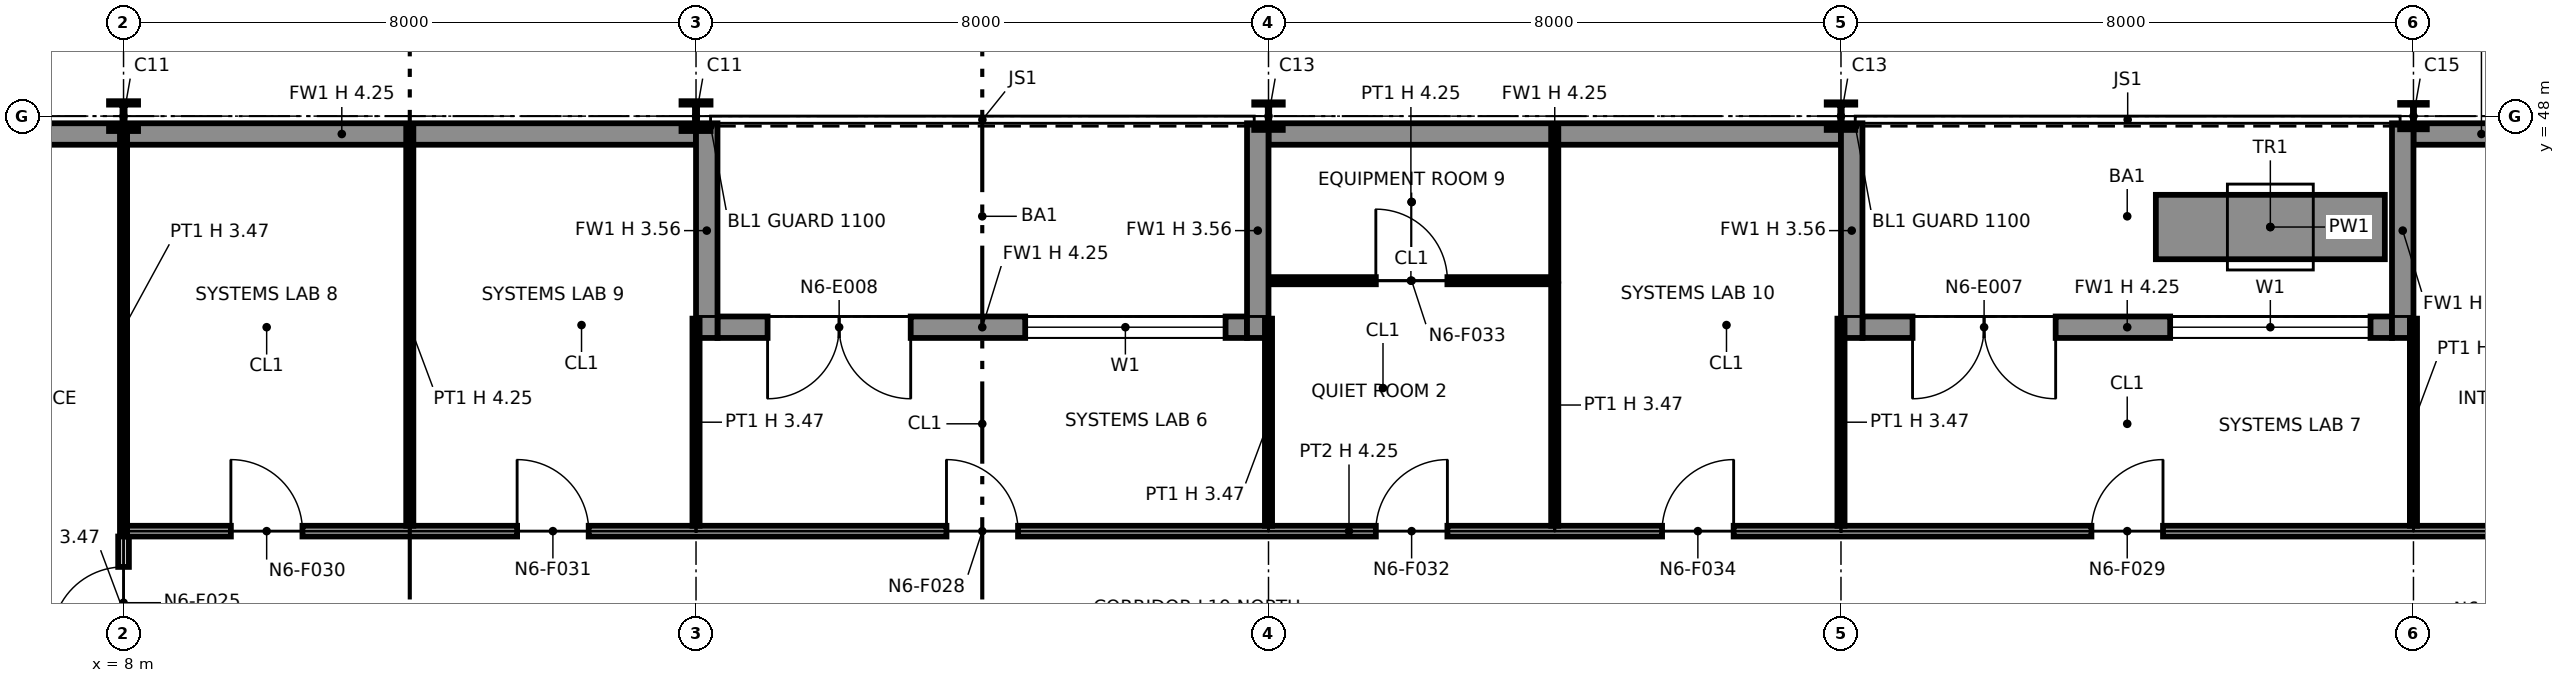
"""IFC4 building model, lengths in metres.
Left out: names, types, materials, properties, quantities, classifications, styles, units other than length and angle.
Written with IfcOpenShell. Run it as: python <this file> out.ifc"""

import sys

from ifc_helpers import new_model, si_unit, direction, frame, frame_2d, origin, origin_2d, place, context, subcontext, project, spatial, polyline, rectangle, i_section, outline, extrude, element, fill, save


model = new_model("IFC4")
c1 = context("Model", 3, precision=1e-05, world=origin(), true_north=direction((0.0, 1.0)))
c2 = subcontext(c1, "Body", "Model", "MODEL_VIEW")
j1 = project(units=[si_unit("LENGTHUNIT", "METRE"), si_unit("PLANEANGLEUNIT", "RADIAN")], contexts=[c1])
p1 = place(None, origin())
s1 = spatial("IfcSite", under=j1, at=p1, CompositionType="ELEMENT")
p2 = place(p1, origin())
s2 = spatial("IfcBuilding", under=s1, at=p2, CompositionType="ELEMENT")
p3 = place(p2, frame((0.0, 0.0, 100.8)))
s3 = spatial("IfcBuildingStorey", under=s2, at=p3, CompositionType="ELEMENT", Elevation=100.8)
for number, where, z_axis, x_axis in (
    (1, (8.0, 48.0, 0.0), (0.0, 0.0, 1.0), (1.0, 0.0, 0.0)),
    (2, (16.0, 48.0, 0.0), (0.0, 0.0, 1.0), (1.0, 0.0, 0.0)),
):
    element("IfcColumn", number, at=place(p3, frame(where, z_axis=z_axis, x_axis=x_axis)), inside=s3, PredefinedType="COLUMN", context=c2, shape_type="SweptSolid", body=[
        extrude(i_section(OverallWidth=0.406, OverallDepth=0.417, WebThickness=0.03, FlangeThickness=0.048, at=origin_2d()), origin(), (0.0, 0.0, 1.0), 4.25),
    ])
for number, where, z_axis, x_axis in (
    (3, (24.0, 48.0, 0.0), (0.0, 0.0, 1.0), (1.0, 0.0, 0.0)),
    (4, (32.0, 48.0, 0.0), (0.0, 0.0, 1.0), (1.0, 0.0, 0.0)),
):
    element("IfcColumn", number, at=place(p3, frame(where, z_axis=z_axis, x_axis=x_axis)), inside=s3, PredefinedType="COLUMN", context=c2, shape_type="SweptSolid", body=[
        extrude(i_section(OverallWidth=0.399, OverallDepth=0.386, WebThickness=0.021, FlangeThickness=0.033, at=origin_2d()), origin(), (0.0, 0.0, 1.0), 4.25),
    ])
p4 = place(p3, frame((40.0, 48.0, 0.0), z_axis=(0.0, 0.0, 1.0), x_axis=(1.0, 0.0, 0.0)))
e5 = element("IfcColumn", 5, at=p4, inside=s3, PredefinedType="COLUMN", context=c2, shape_type="SweptSolid", body=[
    extrude(i_section(OverallWidth=0.373, OverallDepth=0.368, WebThickness=0.015, FlangeThickness=0.024, at=origin_2d()), origin(), (0.0, 0.0, 1.0), 4.25),
])
p5 = place(p3, frame((41.9, 47.75, 0.0), z_axis=(0.0, 0.0, 1.0), x_axis=(-1.0, 0.0, 0.0)))
e6 = element("IfcWall", 6, at=p5, inside=s3, PredefinedType="SOLIDWALL", context=c2, shape_type="SweptSolid", body=[
    extrude(rectangle(XDim=1.9, YDim=0.3, at=frame_2d((0.95, 0.0))), origin(), (0.0, 0.0, 1.0), 4.25),
])
p6 = place(p3, frame((39.7, 45.05, 0.0), z_axis=(0.0, 0.0, 1.0), x_axis=(-1.0, 0.0, 0.0)))
e7 = element("IfcWall", 7, at=p6, inside=s3, PredefinedType="SOLIDWALL", context=c2, shape_type="SweptSolid", body=[
    extrude(rectangle(XDim=7.4, YDim=0.3, at=frame_2d((3.7, 0.0))), origin(), (0.0, 0.0, 1.0), 4.25),
])
p7 = place(p6, frame((0.3, 0.0, 0.9)))
e8 = element("IfcOpeningElement", 8, at=p7, cuts=e7, PredefinedType="OPENING", context=c2, shape_type="SweptSolid", body=[
    extrude(rectangle(XDim=2.8, YDim=2.2, at=frame_2d((1.4, 1.1))), frame((0.0, 0.16, 0.0), z_axis=(0.0, -1.0, 0.0), x_axis=(1.0, 0.0, 0.0)), (0.0, 0.0, 1.0), 0.32),
])
p8 = place(p6, frame((4.7, 0.0, 0.0)))
e9 = element("IfcOpeningElement", 9, at=p8, cuts=e7, PredefinedType="OPENING", context=c2, shape_type="SweptSolid", body=[
    extrude(rectangle(XDim=2.0, YDim=2.4, at=frame_2d((1.0, 1.2))), frame((0.0, 0.16, 0.0), z_axis=(0.0, -1.0, 0.0), x_axis=(1.0, 0.0, 0.0)), (0.0, 0.0, 1.0), 0.32),
])
p9 = place(p3, frame((39.85, 47.9, 0.0), z_axis=(0.0, 0.0, 1.0), x_axis=(0.0, -1.0, 0.0)))
e10 = element("IfcWall", 10, at=p9, inside=s3, PredefinedType="SOLIDWALL", context=c2, shape_type="SweptSolid", body=[
    extrude(rectangle(XDim=3.0, YDim=0.3, at=frame_2d((1.5, 0.0))), origin(), (0.0, 0.0, 1.0), 3.469),
])
p10 = place(p3, frame((32.15, 47.9, 0.0), z_axis=(0.0, 0.0, 1.0), x_axis=(0.0, -1.0, 0.0)))
e11 = element("IfcWall", 11, at=p10, inside=s3, PredefinedType="SOLIDWALL", context=c2, shape_type="SweptSolid", body=[
    extrude(rectangle(XDim=3.0, YDim=0.3, at=frame_2d((1.5, 0.0))), origin(), (0.0, 0.0, 1.0), 3.556),
])
p11 = place(p3, frame((32.0, 47.75, 0.0), z_axis=(0.0, 0.0, 1.0), x_axis=(-1.0, 0.0, 0.0)))
e12 = element("IfcWall", 12, at=p11, inside=s3, PredefinedType="SOLIDWALL", context=c2, shape_type="SweptSolid", body=[
    extrude(rectangle(XDim=8.0, YDim=0.3, at=frame_2d((4.0, 0.0))), origin(), (0.0, 0.0, 1.0), 4.25),
])
p12 = place(p3, frame((23.7, 45.05, 0.0), z_axis=(0.0, 0.0, 1.0), x_axis=(-1.0, 0.0, 0.0)))
e13 = element("IfcWall", 13, at=p12, inside=s3, PredefinedType="SOLIDWALL", context=c2, shape_type="SweptSolid", body=[
    extrude(rectangle(XDim=7.4, YDim=0.3, at=frame_2d((3.7, 0.0))), origin(), (0.0, 0.0, 1.0), 4.25),
])
p13 = place(p12, frame((0.3, 0.0, 0.9)))
e14 = element("IfcOpeningElement", 14, at=p13, cuts=e13, PredefinedType="OPENING", context=c2, shape_type="SweptSolid", body=[
    extrude(rectangle(XDim=2.8, YDim=2.2, at=frame_2d((1.4, 1.1))), frame((0.0, 0.16, 0.0), z_axis=(0.0, -1.0, 0.0), x_axis=(1.0, 0.0, 0.0)), (0.0, 0.0, 1.0), 0.32),
])
p14 = place(p12, frame((4.7, 0.0, 0.0)))
e15 = element("IfcOpeningElement", 15, at=p14, cuts=e13, PredefinedType="OPENING", context=c2, shape_type="SweptSolid", body=[
    extrude(rectangle(XDim=2.0, YDim=2.4, at=frame_2d((1.0, 1.2))), frame((0.0, 0.16, 0.0), z_axis=(0.0, -1.0, 0.0), x_axis=(1.0, 0.0, 0.0)), (0.0, 0.0, 1.0), 0.32),
])
for number, where, z_axis, x_axis in (
    (16, (23.85, 47.9, 0.0), (0.0, 0.0, 1.0), (0.0, -1.0, 0.0)),
    (17, (16.15, 47.9, 0.0), (0.0, 0.0, 1.0), (0.0, -1.0, 0.0)),
):
    element("IfcWall", number, at=place(p3, frame(where, z_axis=z_axis, x_axis=x_axis)), inside=s3, PredefinedType="SOLIDWALL", context=c2, shape_type="SweptSolid", body=[
        extrude(rectangle(XDim=3.0, YDim=0.3, at=frame_2d((1.5, 0.0))), origin(), (0.0, 0.0, 1.0), 3.556),
    ])
p15 = place(p3, frame((16.0, 47.75, 0.0), z_axis=(0.0, 0.0, 1.0), x_axis=(-1.0, 0.0, 0.0)))
e18 = element("IfcWall", 18, at=p15, inside=s3, PredefinedType="SOLIDWALL", context=c2, shape_type="SweptSolid", body=[
    extrude(rectangle(XDim=9.9, YDim=0.3, at=frame_2d((4.95, 0.0))), origin(), (0.0, 0.0, 1.0), 4.25),
])
p16 = place(p3, frame((39.6, 46.45, 0.0), z_axis=(0.0, 0.0, 1.0), x_axis=(-1.0, 0.0, 0.0)))
e19 = element("IfcWall", 19, at=p16, inside=s3, PredefinedType="SOLIDWALL", context=c2, shape_type="SweptSolid", body=[
    extrude(rectangle(XDim=3.2, YDim=0.9, at=frame_2d((1.6, 0.0))), origin(), (0.0, 0.0, 1.0), 0.6),
])
p17 = place(p3, frame((8.0, 40.03, 0.0), z_axis=(0.0, 0.0, 1.0), x_axis=(0.0, 1.0, 0.0)))
e20 = element("IfcWall", 20, at=p17, inside=s3, PredefinedType="PARTITIONING", context=c2, shape_type="SweptSolid", body=[
    extrude(rectangle(XDim=2.095, YDim=0.15, at=frame_2d((1.047, 0.0))), origin(), (0.0, 0.0, 1.0), 3.47),
])
p18 = place(p17, frame((0.67, 0.0, 0.0)))
e21 = element("IfcOpeningElement", 21, at=p18, cuts=e20, PredefinedType="OPENING", context=c2, shape_type="SweptSolid", body=[
    extrude(rectangle(XDim=1.0, YDim=2.1, at=frame_2d((0.5, 1.05))), frame((0.0, 0.085, 0.0), z_axis=(0.0, -1.0, 0.0), x_axis=(1.0, 0.0, 0.0)), (0.0, 0.0, 1.0), 0.17),
])
p19 = place(p3, frame((8.05, 42.2, 0.0), z_axis=(0.0, 0.0, 1.0), x_axis=(1.0, 0.0, 0.0)))
e22 = element("IfcWall", 22, at=p19, inside=s3, PredefinedType="PARTITIONING", context=c2, shape_type="SweptSolid", body=[
    extrude(rectangle(XDim=34.15, YDim=0.15, at=frame_2d((17.075, 0.0))), origin(), (0.0, 0.0, 1.0), 4.25),
])
p20 = place(p19, frame((11.45, 0.0, 0.0)))
e23 = element("IfcOpeningElement", 23, at=p20, cuts=e22, PredefinedType="OPENING", context=c2, shape_type="SweptSolid", body=[
    extrude(rectangle(XDim=1.0, YDim=2.1, at=frame_2d((0.5, 1.05))), frame((0.0, 0.085, 0.0), z_axis=(0.0, -1.0, 0.0), x_axis=(1.0, 0.0, 0.0)), (0.0, 0.0, 1.0), 0.17),
])
p21 = place(p19, frame((27.45, 0.0, 0.0)))
e24 = element("IfcOpeningElement", 24, at=p21, cuts=e22, PredefinedType="OPENING", context=c2, shape_type="SweptSolid", body=[
    extrude(rectangle(XDim=1.0, YDim=2.1, at=frame_2d((0.5, 1.05))), frame((0.0, 0.085, 0.0), z_axis=(0.0, -1.0, 0.0), x_axis=(1.0, 0.0, 0.0)), (0.0, 0.0, 1.0), 0.17),
])
p22 = place(p19, frame((1.45, 0.0, 0.0)))
e25 = element("IfcOpeningElement", 25, at=p22, cuts=e22, PredefinedType="OPENING", context=c2, shape_type="SweptSolid", body=[
    extrude(rectangle(XDim=1.0, YDim=2.1, at=frame_2d((0.5, 1.05))), frame((0.0, 0.085, 0.0), z_axis=(0.0, -1.0, 0.0), x_axis=(1.0, 0.0, 0.0)), (0.0, 0.0, 1.0), 0.17),
])
p23 = place(p19, frame((5.45, 0.0, 0.0)))
e26 = element("IfcOpeningElement", 26, at=p23, cuts=e22, PredefinedType="OPENING", context=c2, shape_type="SweptSolid", body=[
    extrude(rectangle(XDim=1.0, YDim=2.1, at=frame_2d((0.5, 1.05))), frame((0.0, 0.085, 0.0), z_axis=(0.0, -1.0, 0.0), x_axis=(1.0, 0.0, 0.0)), (0.0, 0.0, 1.0), 0.17),
])
p24 = place(p19, frame((17.45, 0.0, 0.0)))
e27 = element("IfcOpeningElement", 27, at=p24, cuts=e22, PredefinedType="OPENING", context=c2, shape_type="SweptSolid", body=[
    extrude(rectangle(XDim=1.0, YDim=2.1, at=frame_2d((0.5, 1.05))), frame((0.0, 0.085, 0.0), z_axis=(0.0, -1.0, 0.0), x_axis=(1.0, 0.0, 0.0)), (0.0, 0.0, 1.0), 0.17),
])
p25 = place(p19, frame((21.45, 0.0, 0.0)))
e28 = element("IfcOpeningElement", 28, at=p25, cuts=e22, PredefinedType="OPENING", context=c2, shape_type="SweptSolid", body=[
    extrude(rectangle(XDim=1.0, YDim=2.1, at=frame_2d((0.5, 1.05))), frame((0.0, 0.085, 0.0), z_axis=(0.0, -1.0, 0.0), x_axis=(1.0, 0.0, 0.0)), (0.0, 0.0, 1.0), 0.17),
])
p26 = place(p3, frame((8.0, 42.2, 0.0), z_axis=(0.0, 0.0, 1.0), x_axis=(0.0, 1.0, 0.0)))
e29 = element("IfcWall", 29, at=p26, inside=s3, PredefinedType="PARTITIONING", context=c2, shape_type="SweptSolid", body=[
    extrude(rectangle(XDim=5.67, YDim=0.1, at=frame_2d((2.835, 0.0))), origin(), (0.0, 0.0, 1.0), 3.47),
])
p27 = place(p3, frame((12.0, 42.275, 0.0), z_axis=(0.0, 0.0, 1.0), x_axis=(0.0, 1.0, 0.0)))
e30 = element("IfcWall", 30, at=p27, inside=s3, PredefinedType="PARTITIONING", context=c2, shape_type="SweptSolid", body=[
    extrude(outline(polyline([(0.0, 0.0), (5.595, 0.0), (5.595, 4.25), (2.025, 4.25), (2.023, 3.47), (1.427, 3.47), (1.425, 4.25), (0.0, 4.25), (0.0, 0.0)])), frame((0.0, 0.05, 0.0), z_axis=(0.0, -1.0, 0.0), x_axis=(1.0, 0.0, 0.0)), (0.0, 0.0, 1.0), 0.1),
])
for number, where, z_axis, x_axis in (
    (31, (16.0, 42.275, 0.0), (0.0, 0.0, 1.0), (0.0, 1.0, 0.0)),
    (32, (24.0, 42.275, 0.0), (0.0, 0.0, 1.0), (0.0, 1.0, 0.0)),
):
    element("IfcWall", number, at=place(p3, frame(where, z_axis=z_axis, x_axis=x_axis)), inside=s3, PredefinedType="PARTITIONING", context=c2, shape_type="SweptSolid", body=[
        extrude(rectangle(XDim=2.895, YDim=0.1, at=frame_2d((1.448, 0.0))), origin(), (0.0, 0.0, 1.0), 3.47),
    ])
p28 = place(p3, frame((28.0, 42.275, 0.0), z_axis=(0.0, 0.0, 1.0), x_axis=(0.0, 1.0, 0.0)))
e33 = element("IfcWall", 33, at=p28, inside=s3, PredefinedType="PARTITIONING", context=c2, shape_type="SweptSolid", body=[
    extrude(rectangle(XDim=3.375, YDim=0.1, at=frame_2d((1.688, 0.0))), origin(), (0.0, 0.0, 1.0), 3.47),
])
for number, where, z_axis, x_axis in (
    (34, (32.0, 42.275, 0.0), (0.0, 0.0, 1.0), (0.0, 1.0, 0.0)),
    (35, (40.0, 42.275, 0.0), (0.0, 0.0, 1.0), (0.0, 1.0, 0.0)),
):
    element("IfcWall", number, at=place(p3, frame(where, z_axis=z_axis, x_axis=x_axis)), inside=s3, PredefinedType="PARTITIONING", context=c2, shape_type="SweptSolid", body=[
        extrude(rectangle(XDim=2.895, YDim=0.1, at=frame_2d((1.448, 0.0))), origin(), (0.0, 0.0, 1.0), 3.47),
    ])
p29 = place(p3, frame((24.03, 45.7, 0.0), z_axis=(0.0, 0.0, 1.0), x_axis=(1.0, 0.0, 0.0)))
e36 = element("IfcWall", 36, at=p29, inside=s3, PredefinedType="PARTITIONING", context=c2, shape_type="SweptSolid", body=[
    extrude(rectangle(XDim=3.92, YDim=0.1, at=frame_2d((1.96, 0.0))), origin(), (0.0, 0.0, 1.0), 4.25),
])
p30 = place(p29, frame((1.47, 0.0, 0.0)))
e37 = element("IfcOpeningElement", 37, at=p30, cuts=e36, PredefinedType="OPENING", context=c2, shape_type="SweptSolid", body=[
    extrude(rectangle(XDim=1.0, YDim=2.1, at=frame_2d((0.5, 1.05))), frame((0.0, 0.06, 0.0), z_axis=(0.0, -1.0, 0.0), x_axis=(1.0, 0.0, 0.0)), (0.0, 0.0, 1.0), 0.12),
])
p31 = place(p3, frame((28.0, 45.7, 0.0), z_axis=(0.0, 0.0, 1.0), x_axis=(0.0, 1.0, 0.0)))
e38 = element("IfcWall", 38, at=p31, inside=s3, PredefinedType="PARTITIONING", context=c2, shape_type="SweptSolid", body=[
    extrude(rectangle(XDim=2.17, YDim=0.1, at=frame_2d((1.085, 0.0))), origin(), (0.0, 0.0, 1.0), 4.25),
])
p32 = place(p7, origin())
e39 = element("IfcWindow", 39, at=p32, inside=s3, PartitioningType="SINGLE_PANEL", PredefinedType="WINDOW", context=c2, shape_type="SweptSolid", body=[
    extrude(rectangle(XDim=2.8, YDim=2.2, at=frame_2d((1.4, 1.1))), frame((0.0, 0.03, 0.0), z_axis=(0.0, -1.0, 0.0), x_axis=(1.0, 0.0, 0.0)), (0.0, 0.0, 1.0), 0.06),
])
fill(e8, e39)
p33 = place(p8, origin())
e40 = element("IfcDoor", 40, at=p33, inside=s3, OperationType="DOUBLE_DOOR_SINGLE_SWING", PredefinedType="DOOR", context=c2, shape_type="SweptSolid", body=[
    extrude(rectangle(XDim=2.0, YDim=2.4, at=frame_2d((1.0, 1.2))), frame((0.0, 0.025, 0.0), z_axis=(0.0, -1.0, 0.0), x_axis=(1.0, 0.0, 0.0)), (0.0, 0.0, 1.0), 0.05),
])
fill(e9, e40)
p34 = place(p13, origin())
e41 = element("IfcWindow", 41, at=p34, inside=s3, PartitioningType="SINGLE_PANEL", PredefinedType="WINDOW", context=c2, shape_type="SweptSolid", body=[
    extrude(rectangle(XDim=2.8, YDim=2.2, at=frame_2d((1.4, 1.1))), frame((0.0, 0.03, 0.0), z_axis=(0.0, -1.0, 0.0), x_axis=(1.0, 0.0, 0.0)), (0.0, 0.0, 1.0), 0.06),
])
fill(e14, e41)
p35 = place(p14, origin())
e42 = element("IfcDoor", 42, at=p35, inside=s3, OperationType="DOUBLE_DOOR_SINGLE_SWING", PredefinedType="DOOR", context=c2, shape_type="SweptSolid", body=[
    extrude(rectangle(XDim=2.0, YDim=2.4, at=frame_2d((1.0, 1.2))), frame((0.0, 0.025, 0.0), z_axis=(0.0, -1.0, 0.0), x_axis=(1.0, 0.0, 0.0)), (0.0, 0.0, 1.0), 0.05),
])
fill(e15, e42)
p36 = place(p18, origin())
e43 = element("IfcDoor", 43, at=p36, inside=s3, OperationType="SINGLE_SWING_LEFT", PredefinedType="DOOR", context=c2, shape_type="SweptSolid", body=[
    extrude(rectangle(XDim=1.0, YDim=2.1, at=frame_2d((0.5, 1.05))), frame((0.0, 0.025, 0.0), z_axis=(0.0, -1.0, 0.0), x_axis=(1.0, 0.0, 0.0)), (0.0, 0.0, 1.0), 0.05),
])
fill(e21, e43)
p37 = place(p20, origin())
e44 = element("IfcDoor", 44, at=p37, inside=s3, OperationType="SINGLE_SWING_LEFT", PredefinedType="DOOR", context=c2, shape_type="SweptSolid", body=[
    extrude(rectangle(XDim=1.0, YDim=2.1, at=frame_2d((0.5, 1.05))), frame((0.0, 0.025, 0.0), z_axis=(0.0, -1.0, 0.0), x_axis=(1.0, 0.0, 0.0)), (0.0, 0.0, 1.0), 0.05),
])
fill(e23, e44)
p38 = place(p21, origin())
e45 = element("IfcDoor", 45, at=p38, inside=s3, OperationType="SINGLE_SWING_RIGHT", PredefinedType="DOOR", context=c2, shape_type="SweptSolid", body=[
    extrude(rectangle(XDim=1.0, YDim=2.1, at=frame_2d((0.5, 1.05))), frame((0.0, 0.025, 0.0), z_axis=(0.0, -1.0, 0.0), x_axis=(1.0, 0.0, 0.0)), (0.0, 0.0, 1.0), 0.05),
])
fill(e24, e45)
p39 = place(p22, origin())
e46 = element("IfcDoor", 46, at=p39, inside=s3, OperationType="SINGLE_SWING_LEFT", PredefinedType="DOOR", context=c2, shape_type="SweptSolid", body=[
    extrude(rectangle(XDim=1.0, YDim=2.1, at=frame_2d((0.5, 1.05))), frame((0.0, 0.025, 0.0), z_axis=(0.0, -1.0, 0.0), x_axis=(1.0, 0.0, 0.0)), (0.0, 0.0, 1.0), 0.05),
])
fill(e25, e46)
p40 = place(p23, origin())
e47 = element("IfcDoor", 47, at=p40, inside=s3, OperationType="SINGLE_SWING_LEFT", PredefinedType="DOOR", context=c2, shape_type="SweptSolid", body=[
    extrude(rectangle(XDim=1.0, YDim=2.1, at=frame_2d((0.5, 1.05))), frame((0.0, 0.025, 0.0), z_axis=(0.0, -1.0, 0.0), x_axis=(1.0, 0.0, 0.0)), (0.0, 0.0, 1.0), 0.05),
])
fill(e26, e47)
p41 = place(p24, origin())
e48 = element("IfcDoor", 48, at=p41, inside=s3, OperationType="SINGLE_SWING_RIGHT", PredefinedType="DOOR", context=c2, shape_type="SweptSolid", body=[
    extrude(rectangle(XDim=1.0, YDim=2.1, at=frame_2d((0.5, 1.05))), frame((0.0, 0.025, 0.0), z_axis=(0.0, -1.0, 0.0), x_axis=(1.0, 0.0, 0.0)), (0.0, 0.0, 1.0), 0.05),
])
fill(e27, e48)
p42 = place(p30, origin())
e49 = element("IfcDoor", 49, at=p42, inside=s3, OperationType="SINGLE_SWING_LEFT", PredefinedType="DOOR", context=c2, shape_type="SweptSolid", body=[
    extrude(rectangle(XDim=1.0, YDim=2.1, at=frame_2d((0.5, 1.05))), frame((0.0, 0.025, 0.0), z_axis=(0.0, -1.0, 0.0), x_axis=(1.0, 0.0, 0.0)), (0.0, 0.0, 1.0), 0.05),
])
fill(e37, e49)
p43 = place(p25, origin())
e50 = element("IfcDoor", 50, at=p43, inside=s3, OperationType="SINGLE_SWING_RIGHT", PredefinedType="DOOR", context=c2, shape_type="SweptSolid", body=[
    extrude(rectangle(XDim=1.0, YDim=2.1, at=frame_2d((0.5, 1.05))), frame((0.0, 0.025, 0.0), z_axis=(0.0, -1.0, 0.0), x_axis=(1.0, 0.0, 0.0)), (0.0, 0.0, 1.0), 0.05),
])
fill(e28, e50)
save(model, sys.argv[1])
